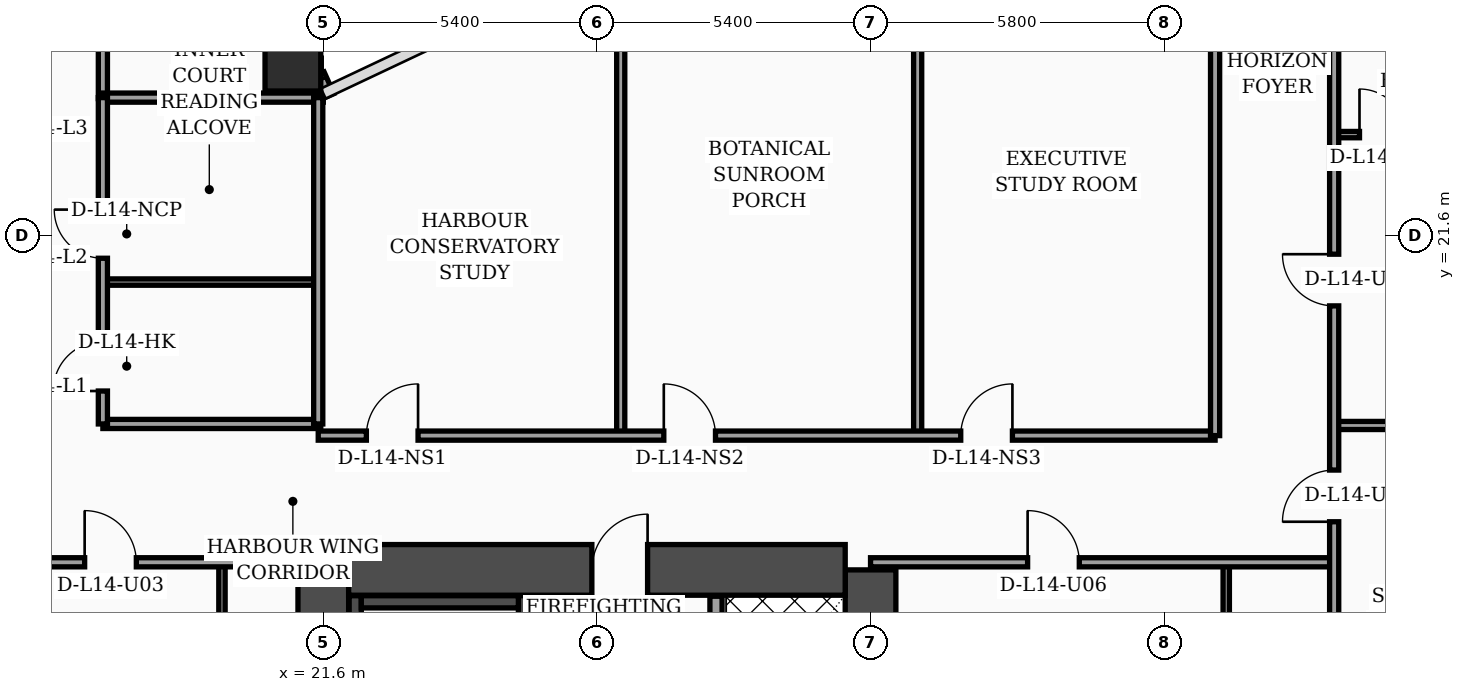
"""IFC4 building model, lengths in metres.
Left out: names, types, materials, properties, quantities, classifications, styles, units other than length and angle.
Written with IfcOpenShell. Run it as: python <this file> out.ifc"""

import sys

from ifc_helpers import new_model, si_unit, direction, frame, frame_2d, origin, origin_2d, place, context, subcontext, project, spatial, rectangle, hollow_rectangle, extrude, element, fill, save


model = new_model("IFC4")
c1 = context("Model", 3, precision=1e-05, world=origin(), true_north=direction((0.0, 1.0)))
c2 = subcontext(c1, "Body", "Model", "MODEL_VIEW")
j1 = project(units=[si_unit("LENGTHUNIT", "METRE"), si_unit("PLANEANGLEUNIT", "RADIAN")], contexts=[c1])
p1 = place(None, origin())
s1 = spatial("IfcSite", under=j1, at=p1, CompositionType="ELEMENT")
p2 = place(p1, origin())
s2 = spatial("IfcBuilding", under=s1, at=p2, CompositionType="ELEMENT")
p3 = place(p2, frame((0.0, 0.0, 62.2)))
s3 = spatial("IfcBuildingStorey", under=s2, at=p3, CompositionType="ELEMENT", Elevation=62.2)
for number, where, z_axis, x_axis in (
    (1, (21.6, 4.6, 0.0), (0.0, 0.0, 1.0), (0.0, 1.0, 0.0)),
    (2, (32.4, 4.6, 0.0), (0.0, 0.0, 1.0), (0.0, 1.0, 0.0)),
):
    element("IfcWall", number, at=place(p3, frame(where, z_axis=z_axis, x_axis=x_axis)), inside=s3, PredefinedType="SHEAR", context=c2, shape_type="SweptSolid", body=[
        extrude(rectangle(XDim=10.4, YDim=1.0, at=frame_2d((5.2, 0.0))), origin(), (0.0, 0.0, 1.0), 3.56),
    ])
p4 = place(p3, frame((22.1, 15.0, 0.0), z_axis=(0.0, 0.0, 1.0), x_axis=(1.0, 0.0, 0.0)))
e3 = element("IfcWall", 3, at=p4, inside=s3, PredefinedType="SHEAR", context=c2, shape_type="SweptSolid", body=[
    extrude(rectangle(XDim=9.8, YDim=1.0, at=frame_2d((4.9, 0.0))), origin(), (0.0, 0.0, 1.0), 3.56),
])
p5 = place(p4, frame((4.8, 0.0, 0.0)))
e4 = element("IfcOpeningElement", 4, at=p5, cuts=e3, PredefinedType="OPENING", context=c2, shape_type="SweptSolid", body=[
    extrude(rectangle(XDim=1.1, YDim=2.2, at=frame_2d((0.55, 1.1))), frame((0.0, 0.51, 0.0), z_axis=(0.0, -1.0, 0.0), x_axis=(1.0, 0.0, 0.0)), (0.0, 0.0, 1.0), 1.02),
])
p6 = place(p3, frame((22.23, 5.1, 0.0), z_axis=(0.0, 0.0, 1.0), x_axis=(0.0, 1.0, 0.0)))
e5 = element("IfcWall", 5, at=p6, inside=s3, PredefinedType="SOLIDWALL", context=c2, shape_type="SweptSolid", body=[
    extrude(rectangle(XDim=9.39, YDim=0.24, at=frame_2d((4.695, 0.0))), origin(), (0.0, 0.0, 1.0), 3.56),
])
p7 = place(p3, frame((25.57, 5.1, 0.0), z_axis=(0.0, 0.0, 1.0), x_axis=(0.0, 1.0, 0.0)))
e6 = element("IfcWall", 6, at=p7, inside=s3, PredefinedType="SOLIDWALL", context=c2, shape_type="SweptSolid", body=[
    extrude(rectangle(XDim=9.39, YDim=0.24, at=frame_2d((4.695, 0.0))), origin(), (0.0, 0.0, 1.0), 3.56),
])
p8 = place(p7, frame((0.35, 0.0, 0.0)))
e7 = element("IfcOpeningElement", 7, at=p8, cuts=e6, PredefinedType="OPENING", context=c2, shape_type="SweptSolid", body=[
    extrude(rectangle(XDim=1.15, YDim=2.2, at=frame_2d((0.575, 1.1))), frame((0.0, 0.13, 0.0), z_axis=(0.0, -1.0, 0.0), x_axis=(1.0, 0.0, 0.0)), (0.0, 0.0, 1.0), 0.26),
])
p9 = place(p3, frame((22.35, 14.37, 0.0), z_axis=(0.0, 0.0, 1.0), x_axis=(1.0, 0.0, 0.0)))
e8 = element("IfcWall", 8, at=p9, inside=s3, PredefinedType="SOLIDWALL", context=c2, shape_type="SweptSolid", body=[
    extrude(rectangle(XDim=3.1, YDim=0.24, at=frame_2d((1.55, 0.0))), origin(), (0.0, 0.0, 1.0), 3.56),
])
p10 = place(p3, frame((21.0, 25.0, 0.0), z_axis=(0.0, 0.0, 1.0), x_axis=(1.0, 0.0, 0.0)))
e9 = element("IfcColumn", 9, at=p10, inside=s3, PredefinedType="COLUMN", context=c2, shape_type="SweptSolid", body=[
    extrude(hollow_rectangle(XDim=1.1, YDim=1.1, WallThickness=0.045, at=origin_2d()), origin(), (0.0, 0.0, 1.0), 3.56),
])
p11 = place(p3, frame((21.68, 24.34, 0.0), z_axis=(0.0, 0.0, 1.0), x_axis=(-0.40758134973, 0.913168901875, 0.0)))
e10 = element("IfcWall", 10, at=p11, inside=s3, PredefinedType="SOLIDWALL", context=c2, shape_type="SweptSolid", body=[
    extrude(rectangle(XDim=0.471, YDim=0.28, at=frame_2d((0.235, 0.0))), origin(), (0.0, 0.0, 1.0), 3.56),
])
p12 = place(p3, frame((29.35, 5.12, 0.0), z_axis=(0.0, 0.0, 1.0), x_axis=(0.0, 1.0, 0.0)))
e11 = element("IfcWall", 11, at=p12, inside=s3, PredefinedType="SOLIDWALL", context=c2, shape_type="SweptSolid", body=[
    extrude(rectangle(XDim=9.36, YDim=0.24, at=frame_2d((4.68, 0.0))), origin(), (0.0, 0.0, 1.0), 3.56),
])
p13 = place(p12, frame((0.55, 0.0, 0.0)))
e12 = element("IfcOpeningElement", 12, at=p13, cuts=e11, PredefinedType="OPENING", context=c2, shape_type="SweptSolid", body=[
    extrude(rectangle(XDim=1.3, YDim=2.35, at=frame_2d((0.65, 1.175))), frame((0.0, 0.13, 0.0), z_axis=(0.0, -1.0, 0.0), x_axis=(1.0, 0.0, 0.0)), (0.0, 0.0, 1.0), 0.26),
])
p14 = place(p3, frame((19.6, 2.44, 0.0), z_axis=(0.0, 0.0, 1.0), x_axis=(0.0, 1.0, 0.0)))
e13 = element("IfcWall", 13, at=p14, inside=s3, PredefinedType="PARTITIONING", context=c2, shape_type="SweptSolid", body=[
    extrude(rectangle(XDim=12.71, YDim=0.125, at=frame_2d((6.355, 0.0))), origin(), (0.0, 0.0, 1.0), 2.34),
])
p15 = place(p14, frame((4.34, 0.0, 0.0)))
e14 = element("IfcOpeningElement", 14, at=p15, cuts=e13, PredefinedType="OPENING", context=c2, shape_type="SweptSolid", body=[
    extrude(rectangle(XDim=0.96, YDim=2.2, at=frame_2d((0.48, 1.1))), frame((0.0, 0.073, 0.0), z_axis=(0.0, -1.0, 0.0), x_axis=(1.0, 0.0, 0.0)), (0.0, 0.0, 1.0), 0.145),
])
p16 = place(p14, frame((10.18, 0.0, 0.0)))
e15 = element("IfcOpeningElement", 15, at=p16, cuts=e13, PredefinedType="OPENING", context=c2, shape_type="SweptSolid", body=[
    extrude(rectangle(XDim=0.9, YDim=2.15, at=frame_2d((0.45, 1.075))), frame((0.0, 0.073, 0.0), z_axis=(0.0, -1.0, 0.0), x_axis=(1.0, 0.0, 0.0)), (0.0, 0.0, 1.0), 0.145),
])
p17 = place(p3, frame((15.15, 15.15, 0.0), z_axis=(0.0, 0.0, 1.0), x_axis=(1.0, 0.0, 0.0)))
e16 = element("IfcWall", 16, at=p17, inside=s3, PredefinedType="PARTITIONING", context=c2, shape_type="SweptSolid", body=[
    extrude(rectangle(XDim=6.45, YDim=0.18, at=frame_2d((3.225, 0.0))), origin(), (0.0, 0.0, 1.0), 2.34),
])
p18 = place(p17, frame((1.74, 0.0, 0.0)))
e17 = element("IfcOpeningElement", 17, at=p18, cuts=e16, PredefinedType="OPENING", context=c2, shape_type="SweptSolid", body=[
    extrude(rectangle(XDim=1.02, YDim=2.2, at=frame_2d((0.51, 1.1))), frame((0.0, 0.1, 0.0), z_axis=(0.0, -1.0, 0.0), x_axis=(1.0, 0.0, 0.0)), (0.0, 0.0, 1.0), 0.2),
])
p19 = place(p3, frame((17.25, 24.3, 0.0), z_axis=(0.0, 0.0, 1.0), x_axis=(0.0, 1.0, 0.0)))
e18 = element("IfcWall", 18, at=p19, inside=s3, PredefinedType="PARTITIONING", context=c2, shape_type="SweptSolid", body=[
    extrude(rectangle(XDim=16.4, YDim=0.18, at=frame_2d((8.2, 0.0))), origin(), (0.0, 0.0, 1.0), 2.84),
])
p20 = place(p3, frame((17.25, 17.88, 0.0), z_axis=(0.0, 0.0, 1.0), x_axis=(1.0, 0.0, 0.0)))
e19 = element("IfcWall", 19, at=p20, inside=s3, PredefinedType="PARTITIONING", context=c2, shape_type="SweptSolid", body=[
    extrude(rectangle(XDim=4.3, YDim=0.18, at=frame_2d((2.15, 0.0))), origin(), (0.0, 0.0, 1.0), 3.56),
])
p21 = place(p3, frame((17.25, 20.68, 0.0), z_axis=(0.0, 0.0, 1.0), x_axis=(1.0, 0.0, 0.0)))
e20 = element("IfcWall", 20, at=p21, inside=s3, PredefinedType="PARTITIONING", context=c2, shape_type="SweptSolid", body=[
    extrude(rectangle(XDim=4.3, YDim=0.125, at=frame_2d((2.15, 0.0))), origin(), (0.0, 0.0, 1.0), 3.56),
])
p22 = place(p3, frame((17.25, 24.32, 0.0), z_axis=(0.0, 0.0, 1.0), x_axis=(1.0, 0.0, 0.0)))
e21 = element("IfcWall", 21, at=p22, inside=s3, PredefinedType="PARTITIONING", context=c2, shape_type="SweptSolid", body=[
    extrude(rectangle(XDim=4.35, YDim=0.18, at=frame_2d((2.175, 0.0))), origin(), (0.0, 0.0, 1.0), 3.56),
])
p23 = place(p3, frame((21.5, 17.88, 0.0), z_axis=(0.0, 0.0, 1.0), x_axis=(0.0, 1.0, 0.0)))
e22 = element("IfcWall", 22, at=p23, inside=s3, PredefinedType="PARTITIONING", context=c2, shape_type="SweptSolid", body=[
    extrude(rectangle(XDim=6.44, YDim=0.18, at=frame_2d((3.22, 0.0))), origin(), (0.0, 0.0, 1.0), 3.09),
])
p24 = place(p3, frame((17.25, 17.88, 0.0), z_axis=(0.0, 0.0, 1.0), x_axis=(0.0, 1.0, 0.0)))
e23 = element("IfcWall", 23, at=p24, inside=s3, PredefinedType="PARTITIONING", context=c2, shape_type="SweptSolid", body=[
    extrude(rectangle(XDim=6.44, YDim=0.18, at=frame_2d((3.22, 0.0))), origin(), (0.0, 0.0, 1.0), 3.09),
])
p25 = place(p24, frame((0.65, 0.0, 0.0)))
e24 = element("IfcOpeningElement", 24, at=p25, cuts=e23, PredefinedType="OPENING", context=c2, shape_type="SweptSolid", body=[
    extrude(rectangle(XDim=0.98, YDim=2.15, at=frame_2d((0.49, 1.075))), frame((0.0, 0.1, 0.0), z_axis=(0.0, -1.0, 0.0), x_axis=(1.0, 0.0, 0.0)), (0.0, 0.0, 1.0), 0.2),
])
p26 = place(p24, frame((3.27, 0.0, 0.0)))
e25 = element("IfcOpeningElement", 25, at=p26, cuts=e23, PredefinedType="OPENING", context=c2, shape_type="SweptSolid", body=[
    extrude(rectangle(XDim=0.96, YDim=2.2, at=frame_2d((0.48, 1.1))), frame((0.0, 0.1, 0.0), z_axis=(0.0, -1.0, 0.0), x_axis=(1.0, 0.0, 0.0)), (0.0, 0.0, 1.0), 0.2),
])
p27 = place(p3, frame((39.42, 2.44, 0.0), z_axis=(0.0, 0.0, 1.0), x_axis=(0.0, 1.0, 0.0)))
e26 = element("IfcWall", 26, at=p27, inside=s3, PredefinedType="PARTITIONING", context=c2, shape_type="SweptSolid", body=[
    extrude(rectangle(XDim=12.71, YDim=0.125, at=frame_2d((6.355, 0.0))), origin(), (0.0, 0.0, 1.0), 2.84),
])
p28 = place(p27, frame((4.35, 0.0, 0.0)))
e27 = element("IfcOpeningElement", 27, at=p28, cuts=e26, PredefinedType="OPENING", context=c2, shape_type="SweptSolid", body=[
    extrude(rectangle(XDim=0.96, YDim=2.2, at=frame_2d((0.48, 1.1))), frame((0.0, 0.073, 0.0), z_axis=(0.0, -1.0, 0.0), x_axis=(1.0, 0.0, 0.0)), (0.0, 0.0, 1.0), 0.145),
])
p29 = place(p27, frame((10.21, 0.0, 0.0)))
e28 = element("IfcOpeningElement", 28, at=p29, cuts=e26, PredefinedType="OPENING", context=c2, shape_type="SweptSolid", body=[
    extrude(rectangle(XDim=0.9, YDim=2.15, at=frame_2d((0.45, 1.075))), frame((0.0, 0.073, 0.0), z_axis=(0.0, -1.0, 0.0), x_axis=(1.0, 0.0, 0.0)), (0.0, 0.0, 1.0), 0.145),
])
p30 = place(p3, frame((32.4, 15.15, 0.0), z_axis=(0.0, 0.0, 1.0), x_axis=(1.0, 0.0, 0.0)))
e29 = element("IfcWall", 29, at=p30, inside=s3, PredefinedType="PARTITIONING", context=c2, shape_type="SweptSolid", body=[
    extrude(rectangle(XDim=9.15, YDim=0.18, at=frame_2d((4.575, 0.0))), origin(), (0.0, 0.0, 1.0), 2.84),
])
p31 = place(p30, frame((3.1, 0.0, 0.0)))
e30 = element("IfcOpeningElement", 30, at=p31, cuts=e29, PredefinedType="OPENING", context=c2, shape_type="SweptSolid", body=[
    extrude(rectangle(XDim=1.02, YDim=2.2, at=frame_2d((0.51, 1.1))), frame((0.0, 0.1, 0.0), z_axis=(0.0, -1.0, 0.0), x_axis=(1.0, 0.0, 0.0)), (0.0, 0.0, 1.0), 0.2),
])
p32 = place(p3, frame((27.47, 17.65, 0.0), z_axis=(0.0, 0.0, 1.0), x_axis=(0.0, 1.0, 0.0)))
e31 = element("IfcWall", 31, at=p32, inside=s3, PredefinedType="PARTITIONING", context=c2, shape_type="SweptSolid", body=[
    extrude(rectangle(XDim=9.6, YDim=0.16, at=frame_2d((4.8, 0.0))), origin(), (0.0, 0.0, 1.0), 2.84),
])
p33 = place(p3, frame((33.33, 17.65, 0.0), z_axis=(0.0, 0.0, 1.0), x_axis=(0.0, 1.0, 0.0)))
e32 = element("IfcWall", 32, at=p33, inside=s3, PredefinedType="PARTITIONING", context=c2, shape_type="SweptSolid", body=[
    extrude(rectangle(XDim=12.37, YDim=0.16, at=frame_2d((6.185, 0.0))), origin(), (0.0, 0.0, 1.0), 2.84),
])
p34 = place(p3, frame((21.5, 17.65, 0.0), z_axis=(0.0, 0.0, 1.0), x_axis=(1.0, 0.0, 0.0)))
e33 = element("IfcWall", 33, at=p34, inside=s3, PredefinedType="PARTITIONING", context=c2, shape_type="SweptSolid", body=[
    extrude(rectangle(XDim=17.7, YDim=0.18, at=frame_2d((8.85, 0.0))), origin(), (0.0, 0.0, 1.0), 2.84),
])
p35 = place(p34, frame((0.95, 0.0, 0.0)))
e34 = element("IfcOpeningElement", 34, at=p35, cuts=e33, PredefinedType="OPENING", context=c2, shape_type="SweptSolid", body=[
    extrude(rectangle(XDim=1.02, YDim=2.2, at=frame_2d((0.51, 1.1))), frame((0.0, 0.1, 0.0), z_axis=(0.0, -1.0, 0.0), x_axis=(1.0, 0.0, 0.0)), (0.0, 0.0, 1.0), 0.2),
])
p36 = place(p34, frame((6.82, 0.0, 0.0)))
e35 = element("IfcOpeningElement", 35, at=p36, cuts=e33, PredefinedType="OPENING", context=c2, shape_type="SweptSolid", body=[
    extrude(rectangle(XDim=1.02, YDim=2.2, at=frame_2d((0.51, 1.1))), frame((0.0, 0.1, 0.0), z_axis=(0.0, -1.0, 0.0), x_axis=(1.0, 0.0, 0.0)), (0.0, 0.0, 1.0), 0.2),
])
p37 = place(p34, frame((12.68, 0.0, 0.0)))
e36 = element("IfcOpeningElement", 36, at=p37, cuts=e33, PredefinedType="OPENING", context=c2, shape_type="SweptSolid", body=[
    extrude(rectangle(XDim=1.02, YDim=2.2, at=frame_2d((0.51, 1.1))), frame((0.0, 0.1, 0.0), z_axis=(0.0, -1.0, 0.0), x_axis=(1.0, 0.0, 0.0)), (0.0, 0.0, 1.0), 0.2),
])
p38 = place(p3, frame((39.2, 17.65, 0.0), z_axis=(0.0, 0.0, 1.0), x_axis=(0.0, 1.0, 0.0)))
e37 = element("IfcWall", 37, at=p38, inside=s3, PredefinedType="PARTITIONING", context=c2, shape_type="SweptSolid", body=[
    extrude(rectangle(XDim=15.14, YDim=0.18, at=frame_2d((7.57, 0.0))), origin(), (0.0, 0.0, 1.0), 2.84),
])
p39 = place(p3, frame((41.55, 23.59, 0.0), z_axis=(0.0, 0.0, 1.0), x_axis=(1.0, 0.0, 0.0)))
e38 = element("IfcWall", 38, at=p39, inside=s3, PredefinedType="PARTITIONING", context=c2, shape_type="SweptSolid", body=[
    extrude(rectangle(XDim=16.32, YDim=0.125, at=frame_2d((8.16, 0.0))), origin(), (0.0, 0.0, 1.0), 2.84),
])
p40 = place(p39, frame((0.5, 0.0, 0.0)))
e39 = element("IfcOpeningElement", 39, at=p40, cuts=e38, PredefinedType="OPENING", context=c2, shape_type="SweptSolid", body=[
    extrude(rectangle(XDim=0.9, YDim=2.15, at=frame_2d((0.45, 1.075))), frame((0.0, 0.073, 0.0), z_axis=(0.0, -1.0, 0.0), x_axis=(1.0, 0.0, 0.0)), (0.0, 0.0, 1.0), 0.145),
])
p41 = place(p39, frame((3.6, 0.0, 0.0)))
e40 = element("IfcOpeningElement", 40, at=p41, cuts=e38, PredefinedType="OPENING", context=c2, shape_type="SweptSolid", body=[
    extrude(rectangle(XDim=0.96, YDim=2.2, at=frame_2d((0.48, 1.1))), frame((0.0, 0.073, 0.0), z_axis=(0.0, -1.0, 0.0), x_axis=(1.0, 0.0, 0.0)), (0.0, 0.0, 1.0), 0.145),
])
p42 = place(p3, frame((41.55, 17.85, 0.0), z_axis=(0.0, 0.0, 1.0), x_axis=(1.0, 0.0, 0.0)))
e41 = element("IfcWall", 41, at=p42, inside=s3, PredefinedType="PARTITIONING", context=c2, shape_type="SweptSolid", body=[
    extrude(rectangle(XDim=18.13, YDim=0.16, at=frame_2d((9.065, 0.0))), origin(), (0.0, 0.0, 1.0), 2.84),
])
p43 = place(p3, frame((41.55, 2.44, 0.0), z_axis=(0.0, 0.0, 1.0), x_axis=(0.0, 1.0, 0.0)))
e42 = element("IfcWall", 42, at=p43, inside=s3, PredefinedType="PARTITIONING", context=c2, shape_type="SweptSolid", body=[
    extrude(rectangle(XDim=31.04, YDim=0.18, at=frame_2d((15.52, 0.0))), origin(), (0.0, 0.0, 1.0), 2.84),
])
p44 = place(p43, frame((13.51, 0.0, 0.0)))
e43 = element("IfcOpeningElement", 43, at=p44, cuts=e42, PredefinedType="OPENING", context=c2, shape_type="SweptSolid", body=[
    extrude(rectangle(XDim=1.02, YDim=2.2, at=frame_2d((0.51, 1.1))), frame((0.0, 0.1, 0.0), z_axis=(0.0, -1.0, 0.0), x_axis=(1.0, 0.0, 0.0)), (0.0, 0.0, 1.0), 0.2),
])
p45 = place(p43, frame((17.77, 0.0, 0.0)))
e44 = element("IfcOpeningElement", 44, at=p45, cuts=e42, PredefinedType="OPENING", context=c2, shape_type="SweptSolid", body=[
    extrude(rectangle(XDim=1.02, YDim=2.2, at=frame_2d((0.51, 1.1))), frame((0.0, 0.1, 0.0), z_axis=(0.0, -1.0, 0.0), x_axis=(1.0, 0.0, 0.0)), (0.0, 0.0, 1.0), 0.2),
])
p46 = place(p43, frame((25.58, 0.0, 0.0)))
e45 = element("IfcOpeningElement", 45, at=p46, cuts=e42, PredefinedType="OPENING", context=c2, shape_type="SweptSolid", body=[
    extrude(rectangle(XDim=1.02, YDim=2.2, at=frame_2d((0.51, 1.1))), frame((0.0, 0.1, 0.0), z_axis=(0.0, -1.0, 0.0), x_axis=(1.0, 0.0, 0.0)), (0.0, 0.0, 1.0), 0.2),
])
p47 = place(p18, origin())
e46 = element("IfcDoor", 46, at=p47, inside=s3, OperationType="SINGLE_SWING_LEFT", PredefinedType="DOOR", context=c2, shape_type="SweptSolid", body=[
    extrude(rectangle(XDim=1.02, YDim=2.2, at=frame_2d((0.51, 1.1))), frame((0.0, 0.025, 0.0), z_axis=(0.0, -1.0, 0.0), x_axis=(1.0, 0.0, 0.0)), (0.0, 0.0, 1.0), 0.05),
])
fill(e17, e46)
p48 = place(p25, origin())
e47 = element("IfcDoor", 47, at=p48, inside=s3, OperationType="SINGLE_SWING_LEFT", PredefinedType="DOOR", context=c2, shape_type="SweptSolid", body=[
    extrude(rectangle(XDim=0.98, YDim=2.15, at=frame_2d((0.49, 1.075))), frame((0.0, 0.025, 0.0), z_axis=(0.0, -1.0, 0.0), x_axis=(1.0, 0.0, 0.0)), (0.0, 0.0, 1.0), 0.05),
])
fill(e24, e47)
p49 = place(p26, origin())
e48 = element("IfcDoor", 48, at=p49, inside=s3, OperationType="SINGLE_SWING_RIGHT", PredefinedType="DOOR", context=c2, shape_type="SweptSolid", body=[
    extrude(rectangle(XDim=0.96, YDim=2.2, at=frame_2d((0.48, 1.1))), frame((0.0, 0.025, 0.0), z_axis=(0.0, -1.0, 0.0), x_axis=(1.0, 0.0, 0.0)), (0.0, 0.0, 1.0), 0.05),
])
fill(e25, e48)
p50 = place(p31, origin())
e49 = element("IfcDoor", 49, at=p50, inside=s3, OperationType="SINGLE_SWING_LEFT", PredefinedType="DOOR", context=c2, shape_type="SweptSolid", body=[
    extrude(rectangle(XDim=1.02, YDim=2.2, at=frame_2d((0.51, 1.1))), frame((0.0, 0.025, 0.0), z_axis=(0.0, -1.0, 0.0), x_axis=(1.0, 0.0, 0.0)), (0.0, 0.0, 1.0), 0.05),
])
fill(e30, e49)
p51 = place(p35, origin())
e50 = element("IfcDoor", 50, at=p51, inside=s3, OperationType="SINGLE_SWING_RIGHT", PredefinedType="DOOR", context=c2, shape_type="SweptSolid", body=[
    extrude(rectangle(XDim=1.02, YDim=2.2, at=frame_2d((0.51, 1.1))), frame((0.0, 0.025, 0.0), z_axis=(0.0, -1.0, 0.0), x_axis=(1.0, 0.0, 0.0)), (0.0, 0.0, 1.0), 0.05),
])
fill(e34, e50)
p52 = place(p36, origin())
e51 = element("IfcDoor", 51, at=p52, inside=s3, OperationType="SINGLE_SWING_LEFT", PredefinedType="DOOR", context=c2, shape_type="SweptSolid", body=[
    extrude(rectangle(XDim=1.02, YDim=2.2, at=frame_2d((0.51, 1.1))), frame((0.0, 0.025, 0.0), z_axis=(0.0, -1.0, 0.0), x_axis=(1.0, 0.0, 0.0)), (0.0, 0.0, 1.0), 0.05),
])
fill(e35, e51)
p53 = place(p37, origin())
e52 = element("IfcDoor", 52, at=p53, inside=s3, OperationType="SINGLE_SWING_RIGHT", PredefinedType="DOOR", context=c2, shape_type="SweptSolid", body=[
    extrude(rectangle(XDim=1.02, YDim=2.2, at=frame_2d((0.51, 1.1))), frame((0.0, 0.025, 0.0), z_axis=(0.0, -1.0, 0.0), x_axis=(1.0, 0.0, 0.0)), (0.0, 0.0, 1.0), 0.05),
])
fill(e36, e52)
p54 = place(p40, origin())
e53 = element("IfcDoor", 53, at=p54, inside=s3, OperationType="SINGLE_SWING_LEFT", PredefinedType="DOOR", context=c2, shape_type="SweptSolid", body=[
    extrude(rectangle(XDim=0.9, YDim=2.15, at=frame_2d((0.45, 1.075))), frame((0.0, 0.025, 0.0), z_axis=(0.0, -1.0, 0.0), x_axis=(1.0, 0.0, 0.0)), (0.0, 0.0, 1.0), 0.05),
])
fill(e39, e53)
p55 = place(p44, origin())
e54 = element("IfcDoor", 54, at=p55, inside=s3, OperationType="SINGLE_SWING_LEFT", PredefinedType="DOOR", context=c2, shape_type="SweptSolid", body=[
    extrude(rectangle(XDim=1.02, YDim=2.2, at=frame_2d((0.51, 1.1))), frame((0.0, 0.025, 0.0), z_axis=(0.0, -1.0, 0.0), x_axis=(1.0, 0.0, 0.0)), (0.0, 0.0, 1.0), 0.05),
])
fill(e43, e54)
p56 = place(p45, origin())
e55 = element("IfcDoor", 55, at=p56, inside=s3, OperationType="SINGLE_SWING_RIGHT", PredefinedType="DOOR", context=c2, shape_type="SweptSolid", body=[
    extrude(rectangle(XDim=1.02, YDim=2.2, at=frame_2d((0.51, 1.1))), frame((0.0, 0.025, 0.0), z_axis=(0.0, -1.0, 0.0), x_axis=(1.0, 0.0, 0.0)), (0.0, 0.0, 1.0), 0.05),
])
fill(e44, e55)
p57 = place(p5, origin())
e56 = element("IfcDoor", 56, at=p57, inside=s3, OperationType="SINGLE_SWING_RIGHT", PredefinedType="DOOR", context=c2, shape_type="SweptSolid", body=[
    extrude(rectangle(XDim=1.1, YDim=2.2, at=frame_2d((0.55, 1.1))), frame((0.0, 0.025, 0.0), z_axis=(0.0, -1.0, 0.0), x_axis=(1.0, 0.0, 0.0)), (0.0, 0.0, 1.0), 0.05),
])
fill(e4, e56)
save(model, sys.argv[1])
